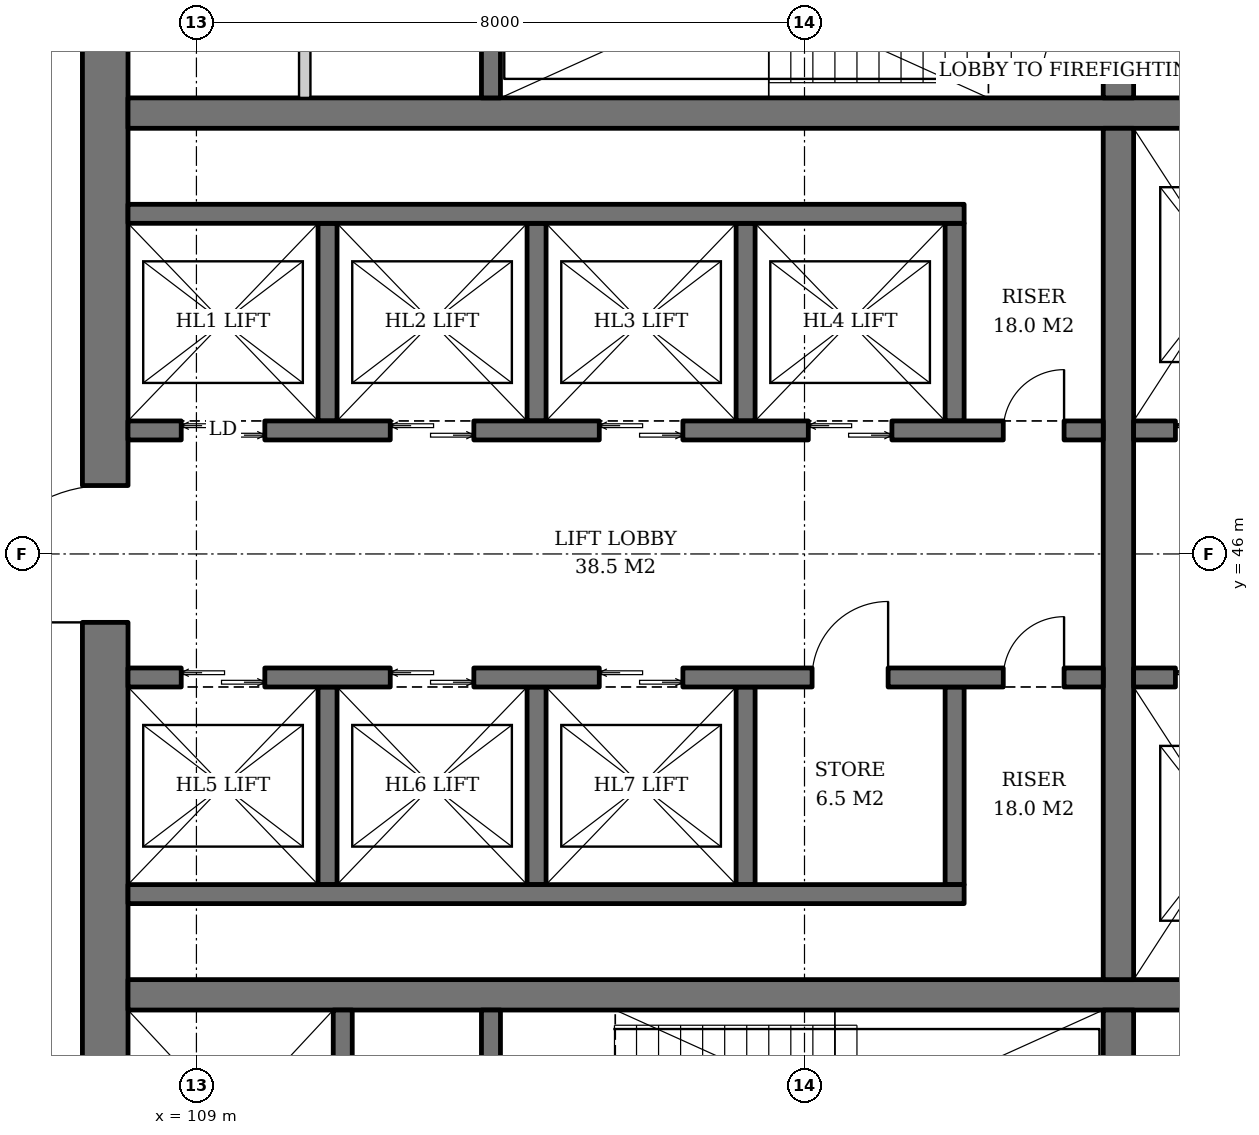
"""IFC4 building model, lengths in metres.
Left out: names, types, materials, properties, quantities, classifications, styles, units other than length and angle.
Written with IfcOpenShell. Run it as: python <this file> out.ifc"""

import sys

from ifc_helpers import new_model, si_unit, direction, frame, frame_2d, origin, place, context, subcontext, project, spatial, rectangle, extrude, element, fill, save


model = new_model("IFC4")
c1 = context("Model", 3, precision=1e-05, world=origin(), true_north=direction((0.0, 1.0)))
c2 = subcontext(c1, "Body", "Model", "MODEL_VIEW")
j1 = project(units=[si_unit("LENGTHUNIT", "METRE"), si_unit("PLANEANGLEUNIT", "RADIAN")], contexts=[c1])
p1 = place(None, origin())
s1 = spatial("IfcSite", under=j1, at=p1, CompositionType="ELEMENT")
p2 = place(p1, origin())
s2 = spatial("IfcBuilding", under=s1, at=p2, CompositionType="ELEMENT")
p3 = place(p2, frame((0.0, 0.0, 108.4)))
s3 = spatial("IfcBuildingStorey", under=s2, at=p3, CompositionType="ELEMENT", Elevation=108.4)
p4 = place(p3, frame((107.8, 37.1, 0.0), z_axis=(0.0, 0.0, 1.0), x_axis=(0.0, 1.0, 0.0)))
e1 = element("IfcWall", 1, at=p4, inside=s3, PredefinedType="SHEAR", context=c2, shape_type="SweptSolid", body=[
    extrude(rectangle(XDim=17.8, YDim=0.6, at=frame_2d((8.9, 0.0))), origin(), (0.0, 0.0, 1.0), 3.8),
])
p5 = place(p4, frame((8.0, 0.0, 0.0)))
e2 = element("IfcOpeningElement", 2, at=p5, cuts=e1, PredefinedType="OPENING", context=c2, shape_type="SweptSolid", body=[
    extrude(rectangle(XDim=1.8, YDim=2.4, at=frame_2d((0.9, 1.2))), frame((0.0, 0.31, 0.0), z_axis=(0.0, -1.0, 0.0), x_axis=(1.0, 0.0, 0.0)), (0.0, 0.0, 1.0), 0.62),
])
for number, where, z_axis, x_axis in (
    (3, (108.1, 40.2, 0.0), (0.0, 0.0, 1.0), (1.0, 0.0, 0.0)),
    (4, (108.1, 51.8, 0.0), (0.0, 0.0, 1.0), (1.0, 0.0, 0.0)),
):
    element("IfcWall", number, at=place(p3, frame(where, z_axis=z_axis, x_axis=x_axis)), inside=s3, PredefinedType="SHEAR", context=c2, shape_type="SweptSolid", body=[
        extrude(rectangle(XDim=17.8, YDim=0.4, at=frame_2d((8.9, 0.0))), origin(), (0.0, 0.0, 1.0), 3.8),
    ])
p6 = place(p3, frame((121.13, 37.1, 0.0), z_axis=(0.0, 0.0, 1.0), x_axis=(0.0, 1.0, 0.0)))
e5 = element("IfcWall", 5, at=p6, inside=s3, PredefinedType="SHEAR", context=c2, shape_type="SweptSolid", body=[
    extrude(rectangle(XDim=2.9, YDim=0.4, at=frame_2d((1.45, 0.0))), origin(), (0.0, 0.0, 1.0), 3.8),
])
p7 = place(p3, frame((121.13, 40.4, 0.0), z_axis=(0.0, 0.0, 1.0), x_axis=(0.0, 1.0, 0.0)))
e6 = element("IfcWall", 6, at=p7, inside=s3, PredefinedType="SHEAR", context=c2, shape_type="SweptSolid", body=[
    extrude(rectangle(XDim=11.2, YDim=0.4, at=frame_2d((5.6, 0.0))), origin(), (0.0, 0.0, 1.0), 3.8),
])
p8 = place(p3, frame((121.13, 52.0, 0.0), z_axis=(0.0, 0.0, 1.0), x_axis=(0.0, 1.0, 0.0)))
e7 = element("IfcWall", 7, at=p8, inside=s3, PredefinedType="SHEAR", context=c2, shape_type="SweptSolid", body=[
    extrude(rectangle(XDim=2.9, YDim=0.4, at=frame_2d((1.45, 0.0))), origin(), (0.0, 0.0, 1.0), 3.8),
])
p9 = place(p8, frame((0.3, 0.0, 0.0)))
e8 = element("IfcOpeningElement", 8, at=p9, cuts=e7, PredefinedType="OPENING", context=c2, shape_type="SweptSolid", body=[
    extrude(rectangle(XDim=1.0, YDim=2.1, at=frame_2d((0.5, 1.05))), frame((0.0, 0.21, 0.0), z_axis=(0.0, -1.0, 0.0), x_axis=(1.0, 0.0, 0.0)), (0.0, 0.0, 1.0), 0.42),
])
p10 = place(p3, frame((110.925, 37.1, 0.0), z_axis=(0.0, 0.0, 1.0), x_axis=(0.0, 1.0, 0.0)))
e9 = element("IfcWall", 9, at=p10, inside=s3, PredefinedType="SHEAR", context=c2, shape_type="SweptSolid", body=[
    extrude(rectangle(XDim=2.9, YDim=0.25, at=frame_2d((1.45, 0.0))), origin(), (0.0, 0.0, 1.0), 3.8),
])
p11 = place(p10, frame((0.8, 0.0, 0.0)))
e10 = element("IfcOpeningElement", 10, at=p11, cuts=e9, PredefinedType="OPENING", context=c2, shape_type="SweptSolid", body=[
    extrude(rectangle(XDim=1.3, YDim=2.2, at=frame_2d((0.65, 1.1))), frame((0.0, 0.135, 0.0), z_axis=(0.0, -1.0, 0.0), x_axis=(1.0, 0.0, 0.0)), (0.0, 0.0, 1.0), 0.27),
])
p12 = place(p3, frame((112.875, 37.1, 0.0), z_axis=(0.0, 0.0, 1.0), x_axis=(0.0, 1.0, 0.0)))
e11 = element("IfcWall", 11, at=p12, inside=s3, PredefinedType="SHEAR", context=c2, shape_type="SweptSolid", body=[
    extrude(rectangle(XDim=2.9, YDim=0.25, at=frame_2d((1.45, 0.0))), origin(), (0.0, 0.0, 1.0), 3.8),
])
p13 = place(p12, frame((0.75, 0.0, 0.0)))
e12 = element("IfcOpeningElement", 12, at=p13, cuts=e11, PredefinedType="OPENING", context=c2, shape_type="SweptSolid", body=[
    extrude(rectangle(XDim=1.2, YDim=2.1, at=frame_2d((0.6, 1.05))), frame((0.0, 0.135, 0.0), z_axis=(0.0, -1.0, 0.0), x_axis=(1.0, 0.0, 0.0)), (0.0, 0.0, 1.0), 0.27),
])
p14 = place(p3, frame((112.875, 52.0, 0.0), z_axis=(0.0, 0.0, 1.0), x_axis=(0.0, 1.0, 0.0)))
e13 = element("IfcWall", 13, at=p14, inside=s3, PredefinedType="SHEAR", context=c2, shape_type="SweptSolid", body=[
    extrude(rectangle(XDim=2.9, YDim=0.25, at=frame_2d((1.45, 0.0))), origin(), (0.0, 0.0, 1.0), 3.8),
])
for number, where, z_axis, x_axis in (
    (14, (110.725, 47.75, 0.0), (0.0, 0.0, 1.0), (0.0, 1.0, 0.0)),
    (15, (113.475, 47.75, 0.0), (0.0, 0.0, 1.0), (0.0, 1.0, 0.0)),
    (16, (116.225, 47.75, 0.0), (0.0, 0.0, 1.0), (0.0, 1.0, 0.0)),
    (17, (118.975, 47.75, 0.0), (0.0, 0.0, 1.0), (0.0, 1.0, 0.0)),
):
    element("IfcWall", number, at=place(p3, frame(where, z_axis=z_axis, x_axis=x_axis)), inside=s3, PredefinedType="SHEAR", context=c2, shape_type="SweptSolid", body=[
        extrude(rectangle(XDim=2.6, YDim=0.25, at=frame_2d((1.3, 0.0))), origin(), (0.0, 0.0, 1.0), 3.8),
    ])
p15 = place(p3, frame((108.1, 50.475, 0.0), z_axis=(0.0, 0.0, 1.0), x_axis=(1.0, 0.0, 0.0)))
e18 = element("IfcWall", 18, at=p15, inside=s3, PredefinedType="SHEAR", context=c2, shape_type="SweptSolid", body=[
    extrude(rectangle(XDim=11.0, YDim=0.25, at=frame_2d((5.5, 0.0))), origin(), (0.0, 0.0, 1.0), 3.8),
])
p16 = place(p3, frame((108.1, 47.625, 0.0), z_axis=(0.0, 0.0, 1.0), x_axis=(1.0, 0.0, 0.0)))
e19 = element("IfcWall", 19, at=p16, inside=s3, PredefinedType="SHEAR", context=c2, shape_type="SweptSolid", body=[
    extrude(rectangle(XDim=12.83, YDim=0.25, at=frame_2d((6.415, 0.0))), origin(), (0.0, 0.0, 1.0), 3.8),
])
p17 = place(p16, frame((0.7, 0.0, 0.0)))
e20 = element("IfcOpeningElement", 20, at=p17, cuts=e19, PredefinedType="OPENING", context=c2, shape_type="SweptSolid", body=[
    extrude(rectangle(XDim=1.1, YDim=2.2, at=frame_2d((0.55, 1.1))), frame((0.0, 0.135, 0.0), z_axis=(0.0, -1.0, 0.0), x_axis=(1.0, 0.0, 0.0)), (0.0, 0.0, 1.0), 0.27),
])
p18 = place(p16, frame((3.45, 0.0, 0.0)))
e21 = element("IfcOpeningElement", 21, at=p18, cuts=e19, PredefinedType="OPENING", context=c2, shape_type="SweptSolid", body=[
    extrude(rectangle(XDim=1.1, YDim=2.2, at=frame_2d((0.55, 1.1))), frame((0.0, 0.135, 0.0), z_axis=(0.0, -1.0, 0.0), x_axis=(1.0, 0.0, 0.0)), (0.0, 0.0, 1.0), 0.27),
])
p19 = place(p16, frame((6.2, 0.0, 0.0)))
e22 = element("IfcOpeningElement", 22, at=p19, cuts=e19, PredefinedType="OPENING", context=c2, shape_type="SweptSolid", body=[
    extrude(rectangle(XDim=1.1, YDim=2.2, at=frame_2d((0.55, 1.1))), frame((0.0, 0.135, 0.0), z_axis=(0.0, -1.0, 0.0), x_axis=(1.0, 0.0, 0.0)), (0.0, 0.0, 1.0), 0.27),
])
p20 = place(p16, frame((8.95, 0.0, 0.0)))
e23 = element("IfcOpeningElement", 23, at=p20, cuts=e19, PredefinedType="OPENING", context=c2, shape_type="SweptSolid", body=[
    extrude(rectangle(XDim=1.1, YDim=2.2, at=frame_2d((0.55, 1.1))), frame((0.0, 0.135, 0.0), z_axis=(0.0, -1.0, 0.0), x_axis=(1.0, 0.0, 0.0)), (0.0, 0.0, 1.0), 0.27),
])
p21 = place(p16, frame((11.515, 0.0, 0.0)))
e24 = element("IfcOpeningElement", 24, at=p21, cuts=e19, PredefinedType="OPENING", context=c2, shape_type="SweptSolid", body=[
    extrude(rectangle(XDim=0.8, YDim=2.0, at=frame_2d((0.4, 1.0))), frame((0.0, 0.135, 0.0), z_axis=(0.0, -1.0, 0.0), x_axis=(1.0, 0.0, 0.0)), (0.0, 0.0, 1.0), 0.27),
])
for number, where, z_axis, x_axis in (
    (25, (110.725, 44.25, 0.0), (0.0, 0.0, 1.0), (0.0, -1.0, 0.0)),
    (26, (113.475, 44.25, 0.0), (0.0, 0.0, 1.0), (0.0, -1.0, 0.0)),
    (27, (116.225, 44.25, 0.0), (0.0, 0.0, 1.0), (0.0, -1.0, 0.0)),
    (28, (118.975, 44.25, 0.0), (0.0, 0.0, 1.0), (0.0, -1.0, 0.0)),
):
    element("IfcWall", number, at=place(p3, frame(where, z_axis=z_axis, x_axis=x_axis)), inside=s3, PredefinedType="SHEAR", context=c2, shape_type="SweptSolid", body=[
        extrude(rectangle(XDim=2.6, YDim=0.25, at=frame_2d((1.3, 0.0))), origin(), (0.0, 0.0, 1.0), 3.8),
    ])
p22 = place(p3, frame((108.1, 41.525, 0.0), z_axis=(0.0, 0.0, 1.0), x_axis=(1.0, 0.0, 0.0)))
e29 = element("IfcWall", 29, at=p22, inside=s3, PredefinedType="SHEAR", context=c2, shape_type="SweptSolid", body=[
    extrude(rectangle(XDim=11.0, YDim=0.25, at=frame_2d((5.5, 0.0))), origin(), (0.0, 0.0, 1.0), 3.8),
])
p23 = place(p3, frame((108.1, 44.375, 0.0), z_axis=(0.0, 0.0, 1.0), x_axis=(1.0, 0.0, 0.0)))
e30 = element("IfcWall", 30, at=p23, inside=s3, PredefinedType="SHEAR", context=c2, shape_type="SweptSolid", body=[
    extrude(rectangle(XDim=12.83, YDim=0.25, at=frame_2d((6.415, 0.0))), origin(), (0.0, 0.0, 1.0), 3.8),
])
p24 = place(p23, frame((0.7, 0.0, 0.0)))
e31 = element("IfcOpeningElement", 31, at=p24, cuts=e30, PredefinedType="OPENING", context=c2, shape_type="SweptSolid", body=[
    extrude(rectangle(XDim=1.1, YDim=2.2, at=frame_2d((0.55, 1.1))), frame((0.0, 0.135, 0.0), z_axis=(0.0, -1.0, 0.0), x_axis=(1.0, 0.0, 0.0)), (0.0, 0.0, 1.0), 0.27),
])
p25 = place(p23, frame((3.45, 0.0, 0.0)))
e32 = element("IfcOpeningElement", 32, at=p25, cuts=e30, PredefinedType="OPENING", context=c2, shape_type="SweptSolid", body=[
    extrude(rectangle(XDim=1.1, YDim=2.2, at=frame_2d((0.55, 1.1))), frame((0.0, 0.135, 0.0), z_axis=(0.0, -1.0, 0.0), x_axis=(1.0, 0.0, 0.0)), (0.0, 0.0, 1.0), 0.27),
])
p26 = place(p23, frame((6.2, 0.0, 0.0)))
e33 = element("IfcOpeningElement", 33, at=p26, cuts=e30, PredefinedType="OPENING", context=c2, shape_type="SweptSolid", body=[
    extrude(rectangle(XDim=1.1, YDim=2.2, at=frame_2d((0.55, 1.1))), frame((0.0, 0.135, 0.0), z_axis=(0.0, -1.0, 0.0), x_axis=(1.0, 0.0, 0.0)), (0.0, 0.0, 1.0), 0.27),
])
p27 = place(p23, frame((9.0, 0.0, 0.0)))
e34 = element("IfcOpeningElement", 34, at=p27, cuts=e30, PredefinedType="OPENING", context=c2, shape_type="SweptSolid", body=[
    extrude(rectangle(XDim=1.0, YDim=2.1, at=frame_2d((0.5, 1.05))), frame((0.0, 0.135, 0.0), z_axis=(0.0, -1.0, 0.0), x_axis=(1.0, 0.0, 0.0)), (0.0, 0.0, 1.0), 0.27),
])
p28 = place(p23, frame((11.515, 0.0, 0.0)))
e35 = element("IfcOpeningElement", 35, at=p28, cuts=e30, PredefinedType="OPENING", context=c2, shape_type="SweptSolid", body=[
    extrude(rectangle(XDim=0.8, YDim=2.0, at=frame_2d((0.4, 1.0))), frame((0.0, 0.135, 0.0), z_axis=(0.0, -1.0, 0.0), x_axis=(1.0, 0.0, 0.0)), (0.0, 0.0, 1.0), 0.27),
])
p29 = place(p3, frame((121.33, 47.625, 0.0), z_axis=(0.0, 0.0, 1.0), x_axis=(1.0, 0.0, 0.0)))
e36 = element("IfcWall", 36, at=p29, inside=s3, PredefinedType="SHEAR", context=c2, shape_type="SweptSolid", body=[
    extrude(rectangle(XDim=4.57, YDim=0.25, at=frame_2d((2.285, 0.0))), origin(), (0.0, 0.0, 1.0), 3.8),
])
p30 = place(p29, frame((0.55, 0.0, 0.0)))
e37 = element("IfcOpeningElement", 37, at=p30, cuts=e36, PredefinedType="OPENING", context=c2, shape_type="SweptSolid", body=[
    extrude(rectangle(XDim=1.4, YDim=2.4, at=frame_2d((0.7, 1.2))), frame((0.0, 0.135, 0.0), z_axis=(0.0, -1.0, 0.0), x_axis=(1.0, 0.0, 0.0)), (0.0, 0.0, 1.0), 0.27),
])
p31 = place(p29, frame((3.26, 0.0, 0.0)))
e38 = element("IfcOpeningElement", 38, at=p31, cuts=e36, PredefinedType="OPENING", context=c2, shape_type="SweptSolid", body=[
    extrude(rectangle(XDim=0.8, YDim=2.0, at=frame_2d((0.4, 1.0))), frame((0.0, 0.135, 0.0), z_axis=(0.0, -1.0, 0.0), x_axis=(1.0, 0.0, 0.0)), (0.0, 0.0, 1.0), 0.27),
])
p32 = place(p3, frame((121.33, 44.375, 0.0), z_axis=(0.0, 0.0, 1.0), x_axis=(1.0, 0.0, 0.0)))
e39 = element("IfcWall", 39, at=p32, inside=s3, PredefinedType="SHEAR", context=c2, shape_type="SweptSolid", body=[
    extrude(rectangle(XDim=4.57, YDim=0.25, at=frame_2d((2.285, 0.0))), origin(), (0.0, 0.0, 1.0), 3.8),
])
p33 = place(p32, frame((0.55, 0.0, 0.0)))
e40 = element("IfcOpeningElement", 40, at=p33, cuts=e39, PredefinedType="OPENING", context=c2, shape_type="SweptSolid", body=[
    extrude(rectangle(XDim=1.4, YDim=2.4, at=frame_2d((0.7, 1.2))), frame((0.0, 0.135, 0.0), z_axis=(0.0, -1.0, 0.0), x_axis=(1.0, 0.0, 0.0)), (0.0, 0.0, 1.0), 0.27),
])
p34 = place(p32, frame((3.26, 0.0, 0.0)))
e41 = element("IfcOpeningElement", 41, at=p34, cuts=e39, PredefinedType="OPENING", context=c2, shape_type="SweptSolid", body=[
    extrude(rectangle(XDim=0.8, YDim=2.0, at=frame_2d((0.4, 1.0))), frame((0.0, 0.135, 0.0), z_axis=(0.0, -1.0, 0.0), x_axis=(1.0, 0.0, 0.0)), (0.0, 0.0, 1.0), 0.27),
])
p35 = place(p3, frame((110.425, 52.0, 0.0), z_axis=(0.0, 0.0, 1.0), x_axis=(0.0, 1.0, 0.0)))
e42 = element("IfcWall", 42, at=p35, inside=s3, PredefinedType="SOLIDWALL", context=c2, shape_type="SweptSolid", body=[
    extrude(rectangle(XDim=2.9, YDim=0.15, at=frame_2d((1.45, 0.0))), origin(), (0.0, 0.0, 1.0), 3.6),
])
p36 = place(p17, origin())
e43 = element("IfcDoor", 43, at=p36, inside=s3, OperationType="DOUBLE_DOOR_SLIDING", PredefinedType="DOOR", context=c2, shape_type="SweptSolid", body=[
    extrude(rectangle(XDim=1.1, YDim=2.2, at=frame_2d((0.55, 1.1))), frame((0.0, 0.025, 0.0), z_axis=(0.0, -1.0, 0.0), x_axis=(1.0, 0.0, 0.0)), (0.0, 0.0, 1.0), 0.05),
])
fill(e20, e43)
p37 = place(p18, origin())
e44 = element("IfcDoor", 44, at=p37, inside=s3, OperationType="DOUBLE_DOOR_SLIDING", PredefinedType="DOOR", context=c2, shape_type="SweptSolid", body=[
    extrude(rectangle(XDim=1.1, YDim=2.2, at=frame_2d((0.55, 1.1))), frame((0.0, 0.025, 0.0), z_axis=(0.0, -1.0, 0.0), x_axis=(1.0, 0.0, 0.0)), (0.0, 0.0, 1.0), 0.05),
])
fill(e21, e44)
p38 = place(p19, origin())
e45 = element("IfcDoor", 45, at=p38, inside=s3, OperationType="DOUBLE_DOOR_SLIDING", PredefinedType="DOOR", context=c2, shape_type="SweptSolid", body=[
    extrude(rectangle(XDim=1.1, YDim=2.2, at=frame_2d((0.55, 1.1))), frame((0.0, 0.025, 0.0), z_axis=(0.0, -1.0, 0.0), x_axis=(1.0, 0.0, 0.0)), (0.0, 0.0, 1.0), 0.05),
])
fill(e22, e45)
p39 = place(p20, origin())
e46 = element("IfcDoor", 46, at=p39, inside=s3, OperationType="DOUBLE_DOOR_SLIDING", PredefinedType="DOOR", context=c2, shape_type="SweptSolid", body=[
    extrude(rectangle(XDim=1.1, YDim=2.2, at=frame_2d((0.55, 1.1))), frame((0.0, 0.025, 0.0), z_axis=(0.0, -1.0, 0.0), x_axis=(1.0, 0.0, 0.0)), (0.0, 0.0, 1.0), 0.05),
])
fill(e23, e46)
p40 = place(p21, origin())
e47 = element("IfcDoor", 47, at=p40, inside=s3, OperationType="SINGLE_SWING_RIGHT", PredefinedType="DOOR", context=c2, shape_type="SweptSolid", body=[
    extrude(rectangle(XDim=0.8, YDim=2.0, at=frame_2d((0.4, 1.0))), frame((0.0, 0.025, 0.0), z_axis=(0.0, -1.0, 0.0), x_axis=(1.0, 0.0, 0.0)), (0.0, 0.0, 1.0), 0.05),
])
fill(e24, e47)
p41 = place(p24, origin())
e48 = element("IfcDoor", 48, at=p41, inside=s3, OperationType="DOUBLE_DOOR_SLIDING", PredefinedType="DOOR", context=c2, shape_type="SweptSolid", body=[
    extrude(rectangle(XDim=1.1, YDim=2.2, at=frame_2d((0.55, 1.1))), frame((0.0, 0.025, 0.0), z_axis=(0.0, -1.0, 0.0), x_axis=(1.0, 0.0, 0.0)), (0.0, 0.0, 1.0), 0.05),
])
fill(e31, e48)
p42 = place(p25, origin())
e49 = element("IfcDoor", 49, at=p42, inside=s3, OperationType="DOUBLE_DOOR_SLIDING", PredefinedType="DOOR", context=c2, shape_type="SweptSolid", body=[
    extrude(rectangle(XDim=1.1, YDim=2.2, at=frame_2d((0.55, 1.1))), frame((0.0, 0.025, 0.0), z_axis=(0.0, -1.0, 0.0), x_axis=(1.0, 0.0, 0.0)), (0.0, 0.0, 1.0), 0.05),
])
fill(e32, e49)
p43 = place(p26, origin())
e50 = element("IfcDoor", 50, at=p43, inside=s3, OperationType="DOUBLE_DOOR_SLIDING", PredefinedType="DOOR", context=c2, shape_type="SweptSolid", body=[
    extrude(rectangle(XDim=1.1, YDim=2.2, at=frame_2d((0.55, 1.1))), frame((0.0, 0.025, 0.0), z_axis=(0.0, -1.0, 0.0), x_axis=(1.0, 0.0, 0.0)), (0.0, 0.0, 1.0), 0.05),
])
fill(e33, e50)
p44 = place(p27, origin())
e51 = element("IfcDoor", 51, at=p44, inside=s3, OperationType="SINGLE_SWING_RIGHT", PredefinedType="DOOR", context=c2, shape_type="SweptSolid", body=[
    extrude(rectangle(XDim=1.0, YDim=2.1, at=frame_2d((0.5, 1.05))), frame((0.0, 0.025, 0.0), z_axis=(0.0, -1.0, 0.0), x_axis=(1.0, 0.0, 0.0)), (0.0, 0.0, 1.0), 0.05),
])
fill(e34, e51)
p45 = place(p28, origin())
e52 = element("IfcDoor", 52, at=p45, inside=s3, OperationType="SINGLE_SWING_RIGHT", PredefinedType="DOOR", context=c2, shape_type="SweptSolid", body=[
    extrude(rectangle(XDim=0.8, YDim=2.0, at=frame_2d((0.4, 1.0))), frame((0.0, 0.025, 0.0), z_axis=(0.0, -1.0, 0.0), x_axis=(1.0, 0.0, 0.0)), (0.0, 0.0, 1.0), 0.05),
])
fill(e35, e52)
p46 = place(p30, origin())
e53 = element("IfcDoor", 53, at=p46, inside=s3, OperationType="DOUBLE_DOOR_SLIDING", PredefinedType="DOOR", context=c2, shape_type="SweptSolid", body=[
    extrude(rectangle(XDim=1.4, YDim=2.4, at=frame_2d((0.7, 1.2))), frame((0.0, 0.025, 0.0), z_axis=(0.0, -1.0, 0.0), x_axis=(1.0, 0.0, 0.0)), (0.0, 0.0, 1.0), 0.05),
])
fill(e37, e53)
p47 = place(p33, origin())
e54 = element("IfcDoor", 54, at=p47, inside=s3, OperationType="DOUBLE_DOOR_SLIDING", PredefinedType="DOOR", context=c2, shape_type="SweptSolid", body=[
    extrude(rectangle(XDim=1.4, YDim=2.4, at=frame_2d((0.7, 1.2))), frame((0.0, 0.025, 0.0), z_axis=(0.0, -1.0, 0.0), x_axis=(1.0, 0.0, 0.0)), (0.0, 0.0, 1.0), 0.05),
])
fill(e40, e54)
p48 = place(p9, origin())
e55 = element("IfcDoor", 55, at=p48, inside=s3, OperationType="SINGLE_SWING_LEFT", PredefinedType="DOOR", context=c2, shape_type="SweptSolid", body=[
    extrude(rectangle(XDim=1.0, YDim=2.1, at=frame_2d((0.5, 1.05))), frame((0.0, 0.025, 0.0), z_axis=(0.0, -1.0, 0.0), x_axis=(1.0, 0.0, 0.0)), (0.0, 0.0, 1.0), 0.05),
])
fill(e8, e55)
p49 = place(p5, origin())
e56 = element("IfcDoor", 56, at=p49, inside=s3, OperationType="DOUBLE_DOOR_SINGLE_SWING", PredefinedType="DOOR", context=c2, shape_type="SweptSolid", body=[
    extrude(rectangle(XDim=1.8, YDim=2.4, at=frame_2d((0.9, 1.2))), frame((0.0, 0.025, 0.0), z_axis=(0.0, -1.0, 0.0), x_axis=(1.0, 0.0, 0.0)), (0.0, 0.0, 1.0), 0.05),
])
fill(e2, e56)
save(model, sys.argv[1])
